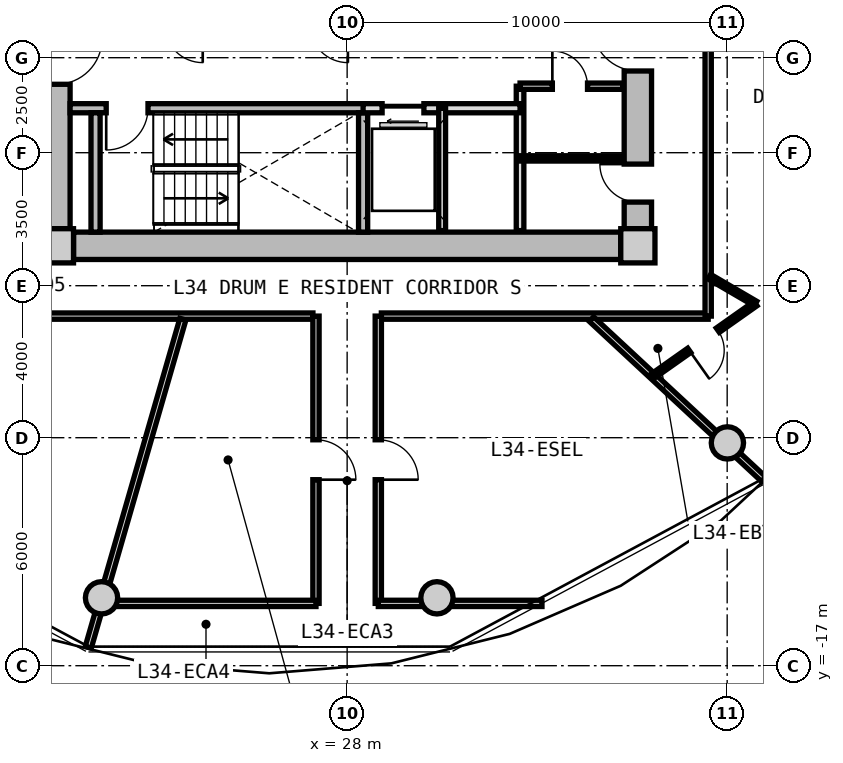
"""IFC4 building model, lengths in metres.
Left out: names, types, materials, properties, quantities, classifications, styles, units other than length and angle.
Written with IfcOpenShell. Run it as: python <this file> out.ifc"""

import sys

from ifc_helpers import new_model, si_unit, direction, frame, frame_2d, origin, origin_2d, place, context, subcontext, project, spatial, rectangle, circle, extrude, source, transform, mapped, element, fill, save


model = new_model("IFC4")
c1 = context("Model", 3, precision=1e-05, world=origin(), true_north=direction((0.0, 1.0)))
c2 = subcontext(c1, "Body", "Model", "MODEL_VIEW")
j1 = project(units=[si_unit("LENGTHUNIT", "METRE"), si_unit("PLANEANGLEUNIT", "RADIAN")], contexts=[c1])
p1 = place(None, origin())
s1 = spatial("IfcSite", under=j1, at=p1, CompositionType="ELEMENT")
p2 = place(p1, origin())
s2 = spatial("IfcBuilding", under=s1, at=p2, CompositionType="ELEMENT")
p3 = place(p2, frame((0.0, 0.0, 111.5)))
s3 = spatial("IfcBuildingStorey", under=s2, at=p3, CompositionType="ELEMENT", Elevation=111.5)
m1 = source(origin(), c2, "Body", "SweptSolid", [
    extrude(rectangle(XDim=0.9, YDim=0.9, at=origin_2d()), origin(), (0.0, 0.0, 1.0), 3.05),
])
for number, where, z_axis, x_axis in (
    (1, (20.35, -5.95, 0.0), (0.0, 0.0, 1.0), (1.0, 0.0, 0.0)),
    (2, (35.65, -5.95, 0.0), (0.0, 0.0, 1.0), (1.0, 0.0, 0.0)),
):
    element("IfcColumn", number, at=place(p3, frame(where, z_axis=z_axis, x_axis=x_axis)), inside=s3, PredefinedType="COLUMN", context=c2, shape_type="MappedRepresentation", body=[
        mapped(m1, transform((0.0, 0.0, 0.0), x_axis=(1.0, 0.0, 0.0), y_axis=(0.0, 1.0, 0.0), z_axis=(0.0, 0.0, 1.0), scale=1.0)),
    ])
m2 = source(origin(), c2, "Body", "SweptSolid", [
    extrude(rectangle(XDim=14.4, YDim=0.72, at=frame_2d((7.2, 0.0))), origin(), (0.0, 0.0, 1.0), 2.79),
])
p4 = place(p3, frame((35.2, -5.95, 0.0), z_axis=(0.0, 0.0, 1.0), x_axis=(-1.0, 0.0, 0.0)))
e3 = element("IfcWall", 3, at=p4, inside=s3, PredefinedType="SHEAR", context=c2, shape_type="MappedRepresentation", body=[
    mapped(m2, transform((0.0, 0.0, 0.0), x_axis=(1.0, 0.0, 0.0), y_axis=(0.0, 1.0, 0.0), z_axis=(0.0, 0.0, 1.0), scale=1.0)),
])
m3 = source(origin(), c2, "Body", "SweptSolid", [
    extrude(rectangle(XDim=11.0, YDim=0.72, at=frame_2d((5.5, 0.0))), origin(), (0.0, 0.0, 1.0), 2.79),
])
p5 = place(p3, frame((20.35, -5.5, 0.0), z_axis=(0.0, 0.0, 1.0), x_axis=(0.0, 1.0, 0.0)))
e4 = element("IfcWall", 4, at=p5, inside=s3, PredefinedType="SHEAR", context=c2, shape_type="MappedRepresentation", body=[
    mapped(m3, transform((0.0, 0.0, 0.0), x_axis=(1.0, 0.0, 0.0), y_axis=(0.0, 1.0, 0.0), z_axis=(0.0, 0.0, 1.0), scale=1.0)),
])
p6 = place(p5, frame((3.8, 0.0, 0.0)))
e5 = element("IfcOpeningElement", 5, at=p6, cuts=e4, PredefinedType="OPENING", context=c2, shape_type="SweptSolid", body=[
    extrude(rectangle(XDim=1.2, YDim=2.15, at=frame_2d((0.6, 1.075))), frame((0.0, 0.37, 0.0), z_axis=(0.0, -1.0, 0.0), x_axis=(1.0, 0.0, 0.0)), (0.0, 0.0, 1.0), 0.74),
])
p7 = place(p3, frame((35.65, 5.5, 0.0), z_axis=(0.0, 0.0, 1.0), x_axis=(0.0, -1.0, 0.0)))
e6 = element("IfcWall", 6, at=p7, inside=s3, PredefinedType="SHEAR", context=c2, shape_type="MappedRepresentation", body=[
    mapped(m3, transform((0.0, 0.0, 0.0), x_axis=(1.0, 0.0, 0.0), y_axis=(0.0, 1.0, 0.0), z_axis=(0.0, 0.0, 1.0), scale=1.0)),
])
p8 = place(p7, frame((5.65, 0.0, 0.0)))
e7 = element("IfcOpeningElement", 7, at=p8, cuts=e6, PredefinedType="OPENING", context=c2, shape_type="SweptSolid", body=[
    extrude(rectangle(XDim=1.2, YDim=2.15, at=frame_2d((0.6, 1.075))), frame((0.0, 0.37, 0.0), z_axis=(0.0, -1.0, 0.0), x_axis=(1.0, 0.0, 0.0)), (0.0, 0.0, 1.0), 0.74),
])
p9 = place(p7, frame((9.3, 0.0, 0.0)))
e8 = element("IfcOpeningElement", 8, at=p9, cuts=e6, PredefinedType="OPENING", context=c2, shape_type="SweptSolid", body=[
    extrude(rectangle(XDim=1.0, YDim=2.1, at=frame_2d((0.5, 1.05))), frame((0.0, 0.37, 0.0), z_axis=(0.0, -1.0, 0.0), x_axis=(1.0, 0.0, 0.0)), (0.0, 0.0, 1.0), 0.74),
])
m4 = source(origin(), c2, "Body", "SweptSolid", [
    extrude(circle(Radius=0.425, at=origin_2d()), origin(), (0.0, 0.0, 1.0), 3.05),
])
for number, where, z_axis, x_axis in (
    (9, (21.537, -15.213, 0.0), (0.0, 0.0, 1.0), (1.0, 0.0, 0.0)),
    (10, (30.363, -15.213, 0.0), (0.0, 0.0, 1.0), (1.0, 0.0, 0.0)),
    (11, (38.006, -11.137, 0.0), (0.0, 0.0, 1.0), (1.0, 0.0, 0.0)),
):
    element("IfcColumn", number, at=place(p3, frame(where, z_axis=z_axis, x_axis=x_axis)), inside=s3, PredefinedType="COLUMN", context=c2, shape_type="MappedRepresentation", body=[
        mapped(m4, transform((0.0, 0.0, 0.0), x_axis=(1.0, 0.0, 0.0), y_axis=(0.0, 1.0, 0.0), z_axis=(0.0, 0.0, 1.0), scale=1.0)),
    ])
m5 = source(origin(), c2, "Body", "SweptSolid", [
    extrude(rectangle(XDim=7.83, YDim=0.24, at=frame_2d((3.915, 0.0))), origin(), (0.0, 0.0, 1.0), 2.79),
])
p10 = place(p3, frame((20.71, -2.33, 0.0), z_axis=(0.0, 0.0, 1.0), x_axis=(1.0, 0.0, 0.0)))
e12 = element("IfcWall", 12, at=p10, inside=s3, PredefinedType="PARTITIONING", context=c2, shape_type="MappedRepresentation", body=[
    mapped(m5, transform((0.0, 0.0, 0.0), x_axis=(1.0, 0.0, 0.0), y_axis=(0.0, 1.0, 0.0), z_axis=(0.0, 0.0, 1.0), scale=1.0)),
])
p11 = place(p10, frame((0.95, 0.0, 0.0)))
e13 = element("IfcOpeningElement", 13, at=p11, cuts=e12, PredefinedType="OPENING", context=c2, shape_type="SweptSolid", body=[
    extrude(rectangle(XDim=1.1, YDim=2.15, at=frame_2d((0.55, 1.075))), frame((0.0, 0.13, 0.0), z_axis=(0.0, -1.0, 0.0), x_axis=(1.0, 0.0, 0.0)), (0.0, 0.0, 1.0), 0.26),
])
m6 = source(origin(), c2, "Body", "SweptSolid", [
    extrude(rectangle(XDim=3.14, YDim=0.24, at=frame_2d((1.57, 0.0))), origin(), (0.0, 0.0, 1.0), 2.79),
])
for number, where, z_axis, x_axis in (
    (14, (21.38, -5.59, 0.0), (0.0, 0.0, 1.0), (0.0, 1.0, 0.0)),
    (15, (28.42, -5.59, 0.0), (0.0, 0.0, 1.0), (0.0, 1.0, 0.0)),
):
    element("IfcWall", number, at=place(p3, frame(where, z_axis=z_axis, x_axis=x_axis)), inside=s3, PredefinedType="PARTITIONING", context=c2, shape_type="MappedRepresentation", body=[
        mapped(m6, transform((0.0, 0.0, 0.0), x_axis=(1.0, 0.0, 0.0), y_axis=(0.0, 1.0, 0.0), z_axis=(0.0, 0.0, 1.0), scale=1.0)),
    ])
m7 = source(origin(), c2, "Body", "SweptSolid", [
    extrude(rectangle(XDim=3.8, YDim=0.2, at=frame_2d((1.9, 0.0))), origin(), (0.0, 0.0, 1.0), 2.775),
])
p12 = place(p3, frame((32.55, -5.55, 0.0), z_axis=(0.0, 0.0, 1.0), x_axis=(0.0, 1.0, 0.0)))
e16 = element("IfcWall", 16, at=p12, inside=s3, PredefinedType="PARTITIONING", context=c2, shape_type="MappedRepresentation", body=[
    mapped(m7, transform((0.0, 0.0, 0.0), x_axis=(1.0, 0.0, 0.0), y_axis=(0.0, 1.0, 0.0), z_axis=(0.0, 0.0, 1.0), scale=1.0)),
])
m8 = source(origin(), c2, "Body", "SweptSolid", [
    extrude(rectangle(XDim=4.13, YDim=0.24, at=frame_2d((2.065, 0.0))), origin(), (0.0, 0.0, 1.0), 2.775),
])
p13 = place(p3, frame((28.42, -2.33, 0.0), z_axis=(0.0, 0.0, 1.0), x_axis=(1.0, 0.0, 0.0)))
e17 = element("IfcWall", 17, at=p13, inside=s3, PredefinedType="PARTITIONING", context=c2, shape_type="MappedRepresentation", body=[
    mapped(m8, transform((0.0, 0.0, 0.0), x_axis=(1.0, 0.0, 0.0), y_axis=(0.0, 1.0, 0.0), z_axis=(0.0, 0.0, 1.0), scale=1.0)),
])
p14 = place(p13, frame((0.5, 0.0, 0.0)))
e18 = element("IfcOpeningElement", 18, at=p14, cuts=e17, PredefinedType="OPENING", context=c2, shape_type="SweptSolid", body=[
    extrude(rectangle(XDim=1.1, YDim=2.2, at=frame_2d((0.55, 1.1))), frame((0.0, 0.13, 0.0), z_axis=(0.0, -1.0, 0.0), x_axis=(1.0, 0.0, 0.0)), (0.0, 0.0, 1.0), 0.26),
])
m9 = source(origin(), c2, "Body", "SweptSolid", [
    extrude(rectangle(XDim=3.22, YDim=0.18, at=frame_2d((1.61, 0.0))), origin(), (0.0, 0.0, 1.0), 2.775),
])
p15 = place(p3, frame((30.5, -5.55, 0.0), z_axis=(0.0, 0.0, 1.0), x_axis=(0.0, 1.0, 0.0)))
e19 = element("IfcWall", 19, at=p15, inside=s3, PredefinedType="PARTITIONING", context=c2, shape_type="MappedRepresentation", body=[
    mapped(m9, transform((0.0, 0.0, 0.0), x_axis=(1.0, 0.0, 0.0), y_axis=(0.0, 1.0, 0.0), z_axis=(0.0, 0.0, 1.0), scale=1.0)),
])
m10 = source(origin(), c2, "Body", "SweptSolid", [
    extrude(rectangle(XDim=2.7, YDim=0.165, at=frame_2d((1.35, 0.0))), origin(), (0.0, 0.0, 1.0), 2.775),
])
p16 = place(p3, frame((32.55, -1.75, 0.0), z_axis=(0.0, 0.0, 1.0), x_axis=(1.0, 0.0, 0.0)))
e20 = element("IfcWall", 20, at=p16, inside=s3, PredefinedType="PARTITIONING", context=c2, shape_type="MappedRepresentation", body=[
    mapped(m10, transform((0.0, 0.0, 0.0), x_axis=(1.0, 0.0, 0.0), y_axis=(0.0, 1.0, 0.0), z_axis=(0.0, 0.0, 1.0), scale=1.0)),
])
p17 = place(p16, frame((0.85, 0.0, 0.0)))
e21 = element("IfcOpeningElement", 21, at=p17, cuts=e20, PredefinedType="OPENING", context=c2, shape_type="SweptSolid", body=[
    extrude(rectangle(XDim=0.925, YDim=2.1, at=frame_2d((0.462, 1.05))), frame((0.0, 0.093, 0.0), z_axis=(0.0, -1.0, 0.0), x_axis=(1.0, 0.0, 0.0)), (0.0, 0.0, 1.0), 0.185),
])
m11 = source(origin(), c2, "Body", "SweptSolid", [
    extrude(rectangle(XDim=2.7, YDim=0.14, at=frame_2d((1.35, 0.0))), origin(), (0.0, 0.0, 1.0), 2.775),
])
p18 = place(p3, frame((32.55, -3.65, 0.0), z_axis=(0.0, 0.0, 1.0), x_axis=(1.0, 0.0, 0.0)))
e22 = element("IfcWall", 22, at=p18, inside=s3, PredefinedType="PARTITIONING", context=c2, shape_type="MappedRepresentation", body=[
    mapped(m11, transform((0.0, 0.0, 0.0), x_axis=(1.0, 0.0, 0.0), y_axis=(0.0, 1.0, 0.0), z_axis=(0.0, 0.0, 1.0), scale=1.0)),
])
m12 = source(origin(), c2, "Body", "SweptSolid", [
    extrude(rectangle(XDim=8.6, YDim=0.165, at=frame_2d((4.3, 0.0))), origin(), (0.0, 0.0, 1.0), 2.775),
])
for number, where, z_axis, x_axis in (
    (23, (37.5, -7.8, 0.0), (0.0, 0.0, 1.0), (-1.0, 0.0, 0.0)),
    (24, (27.1, -7.8, 0.0), (0.0, 0.0, 1.0), (-1.0, 0.0, 0.0)),
):
    element("IfcWall", number, at=place(p3, frame(where, z_axis=z_axis, x_axis=x_axis)), inside=s3, PredefinedType="PARTITIONING", context=c2, shape_type="MappedRepresentation", body=[
        mapped(m12, transform((0.0, 0.0, 0.0), x_axis=(1.0, 0.0, 0.0), y_axis=(0.0, 1.0, 0.0), z_axis=(0.0, 0.0, 1.0), scale=1.0)),
    ])
m13 = source(origin(), c2, "Body", "SweptSolid", [
    extrude(rectangle(XDim=15.6, YDim=0.165, at=frame_2d((7.8, 0.0))), origin(), (0.0, 0.0, 1.0), 2.775),
])
p19 = place(p3, frame((37.5, 7.8, 0.0), z_axis=(0.0, 0.0, 1.0), x_axis=(0.0, -1.0, 0.0)))
e25 = element("IfcWall", 25, at=p19, inside=s3, PredefinedType="PARTITIONING", context=c2, shape_type="MappedRepresentation", body=[
    mapped(m13, transform((0.0, 0.0, 0.0), x_axis=(1.0, 0.0, 0.0), y_axis=(0.0, 1.0, 0.0), z_axis=(0.0, 0.0, 1.0), scale=1.0)),
])
p20 = place(p19, frame((6.87, 0.0, 0.0)))
e26 = element("IfcOpeningElement", 26, at=p20, cuts=e25, PredefinedType="OPENING", context=c2, shape_type="SweptSolid", body=[
    extrude(rectangle(XDim=1.05, YDim=2.15, at=frame_2d((0.525, 1.075))), frame((0.0, 0.093, 0.0), z_axis=(0.0, -1.0, 0.0), x_axis=(1.0, 0.0, 0.0)), (0.0, 0.0, 1.0), 0.185),
])
m14 = source(origin(), c2, "Body", "SweptSolid", [
    extrude(rectangle(XDim=8.989, YDim=0.165, at=frame_2d((4.495, 0.0))), origin(), (0.0, 0.0, 1.0), 2.275),
])
p21 = place(p3, frame((23.678, -7.88, 0.0), z_axis=(0.0, 0.0, 1.0), x_axis=(-0.27702323008, -0.960863221274, 0.0)))
e27 = element("IfcWall", 27, at=p21, inside=s3, PredefinedType="PARTITIONING", context=c2, shape_type="MappedRepresentation", body=[
    mapped(m14, transform((0.0, 0.0, 0.0), x_axis=(1.0, 0.0, 0.0), y_axis=(0.0, 1.0, 0.0), z_axis=(0.0, 0.0, 1.0), scale=1.0)),
])
m15 = source(origin(), c2, "Body", "SweptSolid", [
    extrude(rectangle(XDim=6.187, YDim=0.165, at=frame_2d((3.093, 0.0))), origin(), (0.0, 0.0, 1.0), 2.275),
])
p22 = place(p3, frame((34.429, -7.88, 0.0), z_axis=(0.0, 0.0, 1.0), x_axis=(0.732501077882, -0.680765870841, 0.0)))
e28 = element("IfcWall", 28, at=p22, inside=s3, PredefinedType="PARTITIONING", context=c2, shape_type="MappedRepresentation", body=[
    mapped(m15, transform((0.0, 0.0, 0.0), x_axis=(1.0, 0.0, 0.0), y_axis=(0.0, 1.0, 0.0), z_axis=(0.0, 0.0, 1.0), scale=1.0)),
])
m16 = source(origin(), c2, "Body", "SweptSolid", [
    extrude(rectangle(XDim=7.56, YDim=0.165, at=frame_2d((3.78, 0.0))), origin(), (0.0, 0.0, 1.0), 2.775),
])
p23 = place(p3, frame((27.18, -15.36, 0.0), z_axis=(0.0, 0.0, 1.0), x_axis=(0.0, 1.0, 0.0)))
e29 = element("IfcWall", 29, at=p23, inside=s3, PredefinedType="PARTITIONING", context=c2, shape_type="MappedRepresentation", body=[
    mapped(m16, transform((0.0, 0.0, 0.0), x_axis=(1.0, 0.0, 0.0), y_axis=(0.0, 1.0, 0.0), z_axis=(0.0, 0.0, 1.0), scale=1.0)),
])
p24 = place(p23, frame((3.255, 0.0, 0.0)))
e30 = element("IfcOpeningElement", 30, at=p24, cuts=e29, PredefinedType="OPENING", context=c2, shape_type="SweptSolid", body=[
    extrude(rectangle(XDim=1.05, YDim=2.15, at=frame_2d((0.525, 1.075))), frame((0.0, 0.093, 0.0), z_axis=(0.0, -1.0, 0.0), x_axis=(1.0, 0.0, 0.0)), (0.0, 0.0, 1.0), 0.185),
])
m17 = source(origin(), c2, "Body", "SweptSolid", [
    extrude(rectangle(XDim=5.814, YDim=0.165, at=frame_2d((2.907, 0.0))), origin(), (0.0, 0.0, 1.0), 2.275),
])
p25 = place(p3, frame((21.366, -15.36, 0.0), z_axis=(0.0, 0.0, 1.0), x_axis=(1.0, 0.0, 0.0)))
e31 = element("IfcWall", 31, at=p25, inside=s3, PredefinedType="PARTITIONING", context=c2, shape_type="MappedRepresentation", body=[
    mapped(m17, transform((0.0, 0.0, 0.0), x_axis=(1.0, 0.0, 0.0), y_axis=(0.0, 1.0, 0.0), z_axis=(0.0, 0.0, 1.0), scale=1.0)),
])
p26 = place(p3, frame((28.82, -15.36, 0.0), z_axis=(0.0, 0.0, 1.0), x_axis=(0.0, 1.0, 0.0)))
e32 = element("IfcWall", 32, at=p26, inside=s3, PredefinedType="PARTITIONING", context=c2, shape_type="MappedRepresentation", body=[
    mapped(m16, transform((0.0, 0.0, 0.0), x_axis=(1.0, 0.0, 0.0), y_axis=(0.0, 1.0, 0.0), z_axis=(0.0, 0.0, 1.0), scale=1.0)),
])
p27 = place(p26, frame((3.255, 0.0, 0.0)))
e33 = element("IfcOpeningElement", 33, at=p27, cuts=e32, PredefinedType="OPENING", context=c2, shape_type="SweptSolid", body=[
    extrude(rectangle(XDim=1.05, YDim=2.15, at=frame_2d((0.525, 1.075))), frame((0.0, 0.093, 0.0), z_axis=(0.0, -1.0, 0.0), x_axis=(1.0, 0.0, 0.0)), (0.0, 0.0, 1.0), 0.185),
])
m18 = source(origin(), c2, "Body", "SweptSolid", [
    extrude(rectangle(XDim=4.307, YDim=0.165, at=frame_2d((2.153, 0.0))), origin(), (0.0, 0.0, 1.0), 2.275),
])
p28 = place(p3, frame((28.82, -15.36, 0.0), z_axis=(0.0, 0.0, 1.0), x_axis=(1.0, 0.0, 0.0)))
e34 = element("IfcWall", 34, at=p28, inside=s3, PredefinedType="PARTITIONING", context=c2, shape_type="MappedRepresentation", body=[
    mapped(m18, transform((0.0, 0.0, 0.0), x_axis=(1.0, 0.0, 0.0), y_axis=(0.0, 1.0, 0.0), z_axis=(0.0, 0.0, 1.0), scale=1.0)),
])
m19 = source(origin(), c2, "Body", "SweptSolid", [
    extrude(rectangle(XDim=1.407, YDim=0.14, at=frame_2d((0.704, 0.0))), origin(), (0.0, 0.0, 1.0), 2.775),
])
p29 = place(p3, frame((37.53, -6.762, 0.0), z_axis=(0.0, 0.0, 1.0), x_axis=(0.863539718977, -0.504280828258, 0.0)))
e35 = element("IfcWall", 35, at=p29, inside=s3, PredefinedType="PARTITIONING", context=c2, shape_type="MappedRepresentation", body=[
    mapped(m19, transform((0.0, 0.0, 0.0), x_axis=(1.0, 0.0, 0.0), y_axis=(0.0, 1.0, 0.0), z_axis=(0.0, 0.0, 1.0), scale=1.0)),
])
m20 = source(origin(), c2, "Body", "SweptSolid", [
    extrude(rectangle(XDim=3.347, YDim=0.14, at=frame_2d((1.673, 0.0))), origin(), (0.0, 0.0, 1.0), 2.775),
])
p30 = place(p3, frame((38.745, -7.472, 0.0), z_axis=(0.0, 0.0, 1.0), x_axis=(-0.81705680263, -0.576557179537, 0.0)))
e36 = element("IfcWall", 36, at=p30, inside=s3, PredefinedType="PARTITIONING", context=c2, shape_type="MappedRepresentation", body=[
    mapped(m20, transform((0.0, 0.0, 0.0), x_axis=(1.0, 0.0, 0.0), y_axis=(0.0, 1.0, 0.0), z_axis=(0.0, 0.0, 1.0), scale=1.0)),
])
p31 = place(p30, frame((1.214, 0.0, 0.0)))
e37 = element("IfcOpeningElement", 37, at=p31, cuts=e36, PredefinedType="OPENING", context=c2, shape_type="SweptSolid", body=[
    extrude(rectangle(XDim=0.92, YDim=2.1, at=frame_2d((0.46, 1.05))), frame((0.0, 0.08, 0.0), z_axis=(0.0, -1.0, 0.0), x_axis=(1.0, 0.0, 0.0)), (0.0, 0.0, 1.0), 0.16),
])
m21 = source(origin(), c2, "Body", "SweptSolid", [
    extrude(rectangle(XDim=1.1, YDim=2.15, at=frame_2d((0.55, 1.075))), frame((0.0, 0.025, 0.0), z_axis=(0.0, -1.0, 0.0), x_axis=(1.0, 0.0, 0.0)), (0.0, 0.0, 1.0), 0.05),
])
p32 = place(p11, frame((1.1, 0.0, 0.0), z_axis=(0.0, 0.0, 1.0), x_axis=(-1.0, 0.0, 0.0)))
e38 = element("IfcDoor", 38, at=p32, inside=s3, OperationType="SINGLE_SWING_RIGHT", PredefinedType="DOOR", context=c2, shape_type="MappedRepresentation", body=[
    mapped(m21, transform((0.0, 0.0, 0.0), x_axis=(1.0, 0.0, 0.0), y_axis=(0.0, 1.0, 0.0), z_axis=(0.0, 0.0, 1.0), scale=1.0)),
])
fill(e13, e38)
m22 = source(origin(), c2, "Body", "SweptSolid", [
    extrude(rectangle(XDim=1.2, YDim=2.15, at=frame_2d((0.6, 1.075))), frame((0.0, 0.025, 0.0), z_axis=(0.0, -1.0, 0.0), x_axis=(1.0, 0.0, 0.0)), (0.0, 0.0, 1.0), 0.05),
])
p33 = place(p6, frame((1.2, 0.0, 0.0), z_axis=(0.0, 0.0, 1.0), x_axis=(-1.0, 0.0, 0.0)))
e39 = element("IfcDoor", 39, at=p33, inside=s3, OperationType="SINGLE_SWING_LEFT", PredefinedType="DOOR", context=c2, shape_type="MappedRepresentation", body=[
    mapped(m22, transform((0.0, 0.0, 0.0), x_axis=(1.0, 0.0, 0.0), y_axis=(0.0, 1.0, 0.0), z_axis=(0.0, 0.0, 1.0), scale=1.0)),
])
fill(e5, e39)
p34 = place(p8, frame((1.2, 0.0, 0.0), z_axis=(0.0, 0.0, 1.0), x_axis=(-1.0, 0.0, 0.0)))
e40 = element("IfcDoor", 40, at=p34, inside=s3, OperationType="SINGLE_SWING_RIGHT", PredefinedType="DOOR", context=c2, shape_type="MappedRepresentation", body=[
    mapped(m22, transform((0.0, 0.0, 0.0), x_axis=(1.0, 0.0, 0.0), y_axis=(0.0, 1.0, 0.0), z_axis=(0.0, 0.0, 1.0), scale=1.0)),
])
fill(e7, e40)
m23 = source(origin(), c2, "Body", "SweptSolid", [
    extrude(rectangle(XDim=1.1, YDim=2.2, at=frame_2d((0.55, 1.1))), frame((0.0, 0.025, 0.0), z_axis=(0.0, -1.0, 0.0), x_axis=(1.0, 0.0, 0.0)), (0.0, 0.0, 1.0), 0.05),
])
p35 = place(p14, frame((1.1, 0.0, 0.0), z_axis=(0.0, 0.0, 1.0), x_axis=(-1.0, 0.0, 0.0)))
e41 = element("IfcDoor", 41, at=p35, inside=s3, OperationType="SLIDING_TO_LEFT", PredefinedType="DOOR", context=c2, shape_type="MappedRepresentation", body=[
    mapped(m23, transform((0.0, 0.0, 0.0), x_axis=(1.0, 0.0, 0.0), y_axis=(0.0, 1.0, 0.0), z_axis=(0.0, 0.0, 1.0), scale=1.0)),
])
fill(e18, e41)
m24 = source(origin(), c2, "Body", "SweptSolid", [
    extrude(rectangle(XDim=0.925, YDim=2.1, at=frame_2d((0.462, 1.05))), frame((0.0, 0.025, 0.0), z_axis=(0.0, -1.0, 0.0), x_axis=(1.0, 0.0, 0.0)), (0.0, 0.0, 1.0), 0.05),
])
p36 = place(p17, origin())
e42 = element("IfcDoor", 42, at=p36, inside=s3, OperationType="SINGLE_SWING_LEFT", PredefinedType="DOOR", context=c2, shape_type="MappedRepresentation", body=[
    mapped(m24, transform((0.0, 0.0, 0.0), x_axis=(1.0, 0.0, 0.0), y_axis=(0.0, 1.0, 0.0), z_axis=(0.0, 0.0, 1.0), scale=1.0)),
])
fill(e21, e42)
m25 = source(origin(), c2, "Body", "SweptSolid", [
    extrude(rectangle(XDim=1.0, YDim=2.1, at=frame_2d((0.5, 1.05))), frame((0.0, 0.025, 0.0), z_axis=(0.0, -1.0, 0.0), x_axis=(1.0, 0.0, 0.0)), (0.0, 0.0, 1.0), 0.05),
])
p37 = place(p9, frame((1.0, 0.0, 0.0), z_axis=(0.0, 0.0, 1.0), x_axis=(-1.0, 0.0, 0.0)))
e43 = element("IfcDoor", 43, at=p37, inside=s3, OperationType="SINGLE_SWING_RIGHT", PredefinedType="DOOR", context=c2, shape_type="MappedRepresentation", body=[
    mapped(m25, transform((0.0, 0.0, 0.0), x_axis=(1.0, 0.0, 0.0), y_axis=(0.0, 1.0, 0.0), z_axis=(0.0, 0.0, 1.0), scale=1.0)),
])
fill(e8, e43)
m26 = source(origin(), c2, "Body", "SweptSolid", [
    extrude(rectangle(XDim=1.05, YDim=2.15, at=frame_2d((0.525, 1.075))), frame((0.0, 0.025, 0.0), z_axis=(0.0, -1.0, 0.0), x_axis=(1.0, 0.0, 0.0)), (0.0, 0.0, 1.0), 0.05),
])
p38 = place(p24, frame((1.05, 0.0, 0.0), z_axis=(0.0, 0.0, 1.0), x_axis=(-1.0, 0.0, 0.0)))
e44 = element("IfcDoor", 44, at=p38, inside=s3, OperationType="SINGLE_SWING_RIGHT", PredefinedType="DOOR", context=c2, shape_type="MappedRepresentation", body=[
    mapped(m26, transform((0.0, 0.0, 0.0), x_axis=(1.0, 0.0, 0.0), y_axis=(0.0, 1.0, 0.0), z_axis=(0.0, 0.0, 1.0), scale=1.0)),
])
fill(e30, e44)
p39 = place(p27, frame((1.05, 0.0, 0.0), z_axis=(0.0, 0.0, 1.0), x_axis=(-1.0, 0.0, 0.0)))
e45 = element("IfcDoor", 45, at=p39, inside=s3, OperationType="SINGLE_SWING_RIGHT", PredefinedType="DOOR", context=c2, shape_type="MappedRepresentation", body=[
    mapped(m26, transform((0.0, 0.0, 0.0), x_axis=(1.0, 0.0, 0.0), y_axis=(0.0, 1.0, 0.0), z_axis=(0.0, 0.0, 1.0), scale=1.0)),
])
fill(e33, e45)
m27 = source(origin(), c2, "Body", "SweptSolid", [
    extrude(rectangle(XDim=0.92, YDim=2.1, at=frame_2d((0.46, 1.05))), frame((0.0, 0.025, 0.0), z_axis=(0.0, -1.0, 0.0), x_axis=(1.0, 0.0, 0.0)), (0.0, 0.0, 1.0), 0.05),
])
p40 = place(p31, origin())
e46 = element("IfcDoor", 46, at=p40, inside=s3, OperationType="SINGLE_SWING_RIGHT", PredefinedType="DOOR", context=c2, shape_type="MappedRepresentation", body=[
    mapped(m27, transform((0.0, 0.0, 0.0), x_axis=(1.0, 0.0, 0.0), y_axis=(0.0, 1.0, 0.0), z_axis=(0.0, 0.0, 1.0), scale=1.0)),
])
fill(e37, e46)
save(model, sys.argv[1])
